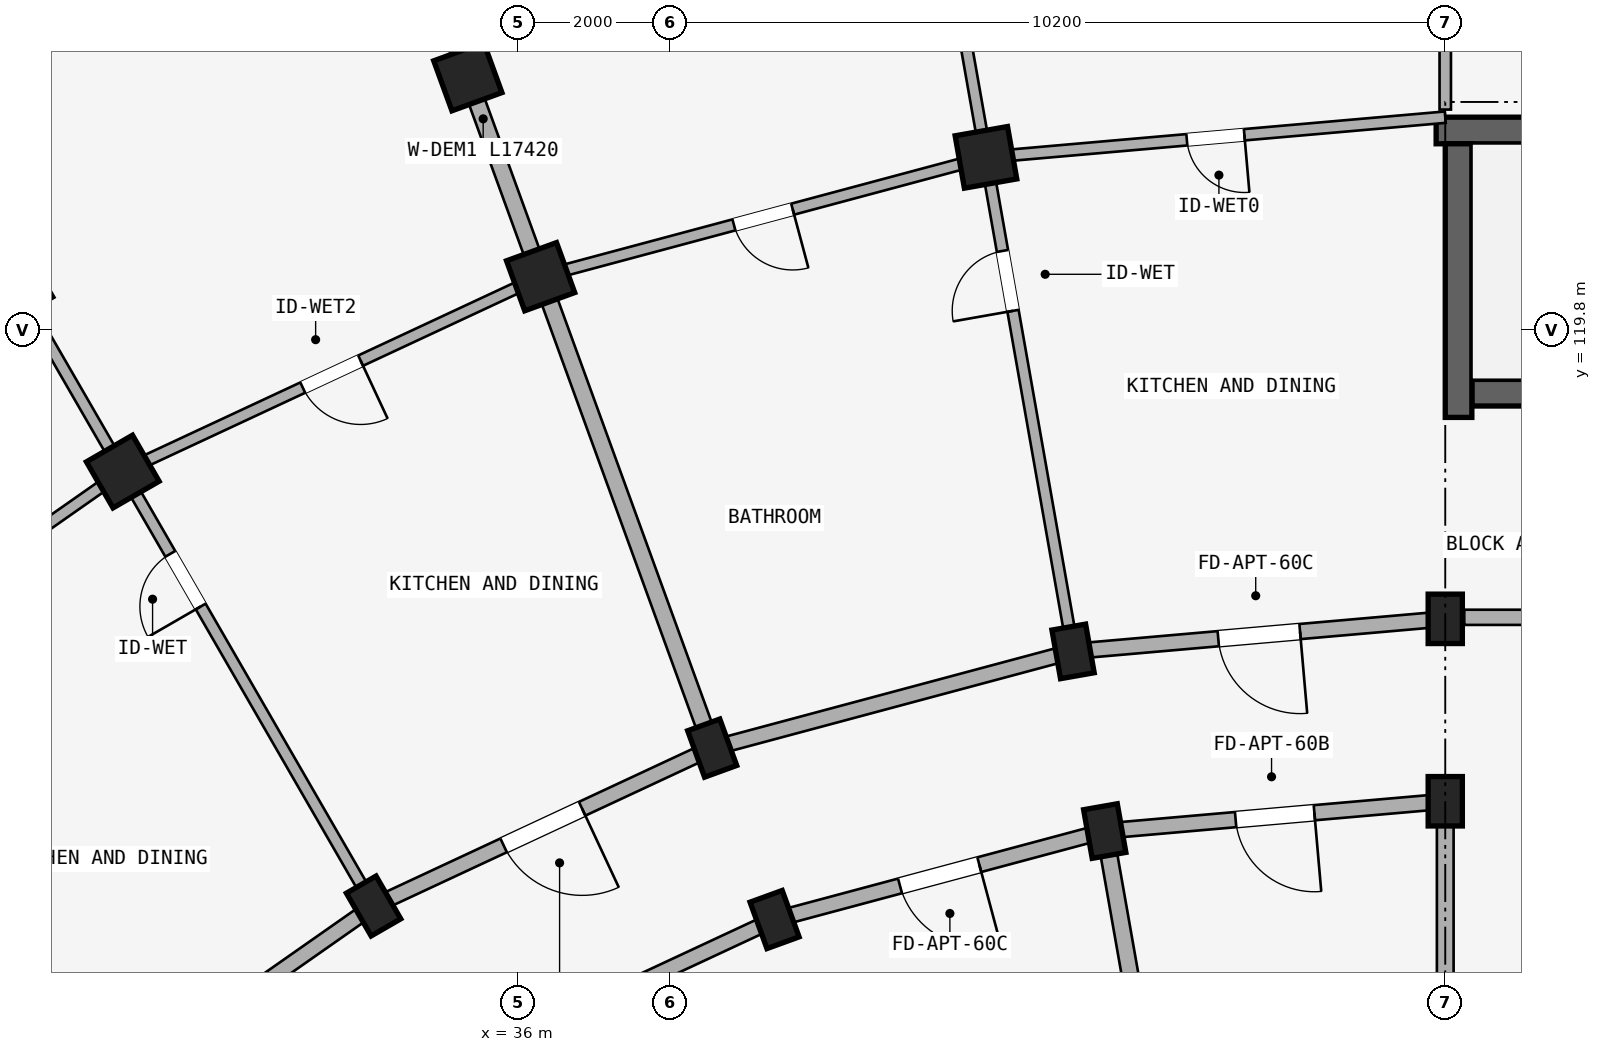
"""IFC4 building model, lengths in metres.
Left out: names, types, materials, properties, quantities, classifications, styles, units other than length and angle.
Written with IfcOpenShell. Run it as: python <this file> out.ifc"""

import sys

from ifc_helpers import new_model, si_unit, direction, frame, frame_2d, origin, origin_2d, place, context, subcontext, project, spatial, rectangle, extrude, element, fill, save


model = new_model("IFC4")
c1 = context("Model", 3, precision=1e-05, world=origin(), true_north=direction((0.0, 1.0)))
c2 = subcontext(c1, "Body", "Model", "MODEL_VIEW")
j1 = project(units=[si_unit("LENGTHUNIT", "METRE"), si_unit("PLANEANGLEUNIT", "RADIAN")], contexts=[c1])
p1 = place(None, origin())
s1 = spatial("IfcSite", under=j1, at=p1, CompositionType="ELEMENT")
p2 = place(p1, origin())
s2 = spatial("IfcBuilding", under=s1, at=p2, CompositionType="ELEMENT")
p3 = place(p2, frame((0.0, 0.0, 27.6)))
s3 = spatial("IfcBuildingStorey", under=s2, at=p3, CompositionType="ELEMENT", Elevation=27.6)
p4 = place(p3, frame((48.08, 122.425, 0.0), z_axis=(0.0, 0.0, 1.0), x_axis=(1.0, 0.0, 0.0)))
e1 = element("IfcWall", 1, at=p4, inside=s3, PredefinedType="SHEAR", context=c2, shape_type="SweptSolid", body=[
    extrude(rectangle(XDim=8.545, YDim=0.35, at=frame_2d((4.272, 0.0))), origin(), (0.0, 0.0, 1.0), 2.93),
])
p5 = place(p3, frame((48.55, 118.975, 0.0), z_axis=(0.0, 0.0, 1.0), x_axis=(1.0, 0.0, 0.0)))
e2 = element("IfcWall", 2, at=p5, inside=s3, PredefinedType="SHEAR", context=c2, shape_type="SweptSolid", body=[
    extrude(rectangle(XDim=8.075, YDim=0.35, at=frame_2d((4.038, 0.0))), origin(), (0.0, 0.0, 1.0), 2.93),
])
p6 = place(p5, frame((6.38, 0.0, 0.0)))
e3 = element("IfcOpeningElement", 3, at=p6, cuts=e2, PredefinedType="OPENING", context=c2, shape_type="SweptSolid", body=[
    extrude(rectangle(XDim=1.24, YDim=2.15, at=frame_2d((0.62, 1.075))), frame((0.0, 0.185, 0.0), z_axis=(0.0, -1.0, 0.0), x_axis=(1.0, 0.0, 0.0)), (0.0, 0.0, 1.0), 0.37),
])
p7 = place(p3, frame((48.375, 118.65, 0.0), z_axis=(0.0, 0.0, 1.0), x_axis=(0.0, 1.0, 0.0)))
e4 = element("IfcWall", 4, at=p7, inside=s3, PredefinedType="SHEAR", context=c2, shape_type="SweptSolid", body=[
    extrude(rectangle(XDim=3.6, YDim=0.35, at=frame_2d((1.8, 0.0))), origin(), (0.0, 0.0, 1.0), 2.93),
])
for number, where, z_axis, x_axis in (
    (5, (48.2, 113.6, 0.0), (0.0, 0.0, 1.0), (1.0, 0.0, 0.0)),
    (6, (48.2, 116.0, 0.0), (0.0, 0.0, 1.0), (1.0, 0.0, 0.0)),
    (7, (43.72, 113.208, 0.0), (0.0, 0.0, 1.0), (0.985, 0.174, 0.0)),
    (8, (43.303, 115.572, 0.0), (0.0, 0.0, 1.0), (0.985, 0.174, 0.0)),
):
    element("IfcColumn", number, at=place(p3, frame(where, z_axis=z_axis, x_axis=x_axis)), inside=s3, PredefinedType="COLUMN", context=c2, shape_type="SweptSolid", body=[
        extrude(rectangle(XDim=0.45, YDim=0.65, at=origin_2d()), origin(), (0.0, 0.0, 1.0), 2.93),
    ])
p8 = place(p3, frame((42.157, 122.071, 0.0), z_axis=(0.0, 0.0, 1.0), x_axis=(0.984807753012, 0.173648177667, 0.0)))
e9 = element("IfcColumn", 9, at=p8, inside=s3, PredefinedType="COLUMN", context=c2, shape_type="SweptSolid", body=[
    extrude(rectangle(XDim=0.7, YDim=0.7, at=origin_2d()), origin(), (0.0, 0.0, 1.0), 2.93),
])
for number, where, z_axis, x_axis in (
    (10, (39.376, 112.044, 0.0), (0.0, 0.0, 1.0), (0.94, 0.342, 0.0)),
    (11, (38.555, 114.299, 0.0), (0.0, 0.0, 1.0), (0.94, 0.342, 0.0)),
):
    element("IfcColumn", number, at=place(p3, frame(where, z_axis=z_axis, x_axis=x_axis)), inside=s3, PredefinedType="COLUMN", context=c2, shape_type="SweptSolid", body=[
        extrude(rectangle(XDim=0.45, YDim=0.65, at=origin_2d()), origin(), (0.0, 0.0, 1.0), 2.93),
    ])
for number, where, z_axis, x_axis in (
    (12, (36.298, 120.501, 0.0), (0.0, 0.0, 1.0), (0.94, 0.342, 0.0)),
    (13, (35.34, 123.132, 0.0), (0.0, 0.0, 1.0), (0.94, 0.342, 0.0)),
):
    element("IfcColumn", number, at=place(p3, frame(where, z_axis=z_axis, x_axis=x_axis)), inside=s3, PredefinedType="COLUMN", context=c2, shape_type="SweptSolid", body=[
        extrude(rectangle(XDim=0.7, YDim=0.7, at=origin_2d()), origin(), (0.0, 0.0, 1.0), 2.93),
    ])
p9 = place(p3, frame((34.1, 112.222, 0.0), z_axis=(0.0, 0.0, 1.0), x_axis=(0.866025403784, 0.5, 0.0)))
e14 = element("IfcColumn", 14, at=p9, inside=s3, PredefinedType="COLUMN", context=c2, shape_type="SweptSolid", body=[
    extrude(rectangle(XDim=0.45, YDim=0.65, at=origin_2d()), origin(), (0.0, 0.0, 1.0), 2.93),
])
for number, where, z_axis, x_axis in (
    (15, (30.8, 117.938, 0.0), (0.0, 0.0, 1.0), (0.866, 0.5, 0.0)),
    (16, (29.4, 120.363, 0.0), (0.0, 0.0, 1.0), (0.866, 0.5, 0.0)),
):
    element("IfcColumn", number, at=place(p3, frame(where, z_axis=z_axis, x_axis=x_axis)), inside=s3, PredefinedType="COLUMN", context=c2, shape_type="SweptSolid", body=[
        extrude(rectangle(XDim=0.7, YDim=0.7, at=origin_2d()), origin(), (0.0, 0.0, 1.0), 2.93),
    ])
p10 = place(p3, frame((48.45, 116.02, 0.0), z_axis=(0.0, 0.0, 1.0), x_axis=(1.0, 0.0, 0.0)))
e17 = element("IfcWall", 17, at=p10, inside=s3, PredefinedType="STANDARD", context=c2, shape_type="SweptSolid", body=[
    extrude(rectangle(XDim=5.25, YDim=0.2, at=frame_2d((2.625, 0.0))), origin(), (0.0, 0.0, 1.0), 2.372),
])
p11 = place(p10, frame((2.165, 0.0, 0.0)))
e18 = element("IfcOpeningElement", 18, at=p11, cuts=e17, PredefinedType="OPENING", context=c2, shape_type="SweptSolid", body=[
    extrude(rectangle(XDim=0.92, YDim=2.1, at=frame_2d((0.46, 1.05))), frame((0.0, 0.11, 0.0), z_axis=(0.0, -1.0, 0.0), x_axis=(1.0, 0.0, 0.0)), (0.0, 0.0, 1.0), 0.22),
])
p12 = place(p3, frame((48.2, 113.6, 0.0), z_axis=(0.0, 0.0, 1.0), x_axis=(-0.996191949488, -0.087187153726, 0.0)))
e19 = element("IfcWall", 19, at=p12, inside=s3, PredefinedType="STANDARD", context=c2, shape_type="SweptSolid", body=[
    extrude(rectangle(XDim=4.497, YDim=0.2, at=frame_2d((2.249, 0.0))), origin(), (0.0, 0.0, 1.0), 2.372),
])
p13 = place(p12, frame((1.729, 0.0, 0.0)))
e20 = element("IfcOpeningElement", 20, at=p13, cuts=e19, PredefinedType="OPENING", context=c2, shape_type="SweptSolid", body=[
    extrude(rectangle(XDim=1.04, YDim=2.15, at=frame_2d((0.52, 1.075))), frame((0.0, 0.11, 0.0), z_axis=(0.0, -1.0, 0.0), x_axis=(1.0, 0.0, 0.0)), (0.0, 0.0, 1.0), 0.22),
])
p14 = place(p3, frame((48.2, 116.0, 0.0), z_axis=(0.0, 0.0, 1.0), x_axis=(-0.996193663584, -0.087167566415, 0.0)))
e21 = element("IfcWall", 21, at=p14, inside=s3, PredefinedType="STANDARD", context=c2, shape_type="SweptSolid", body=[
    extrude(rectangle(XDim=4.916, YDim=0.2, at=frame_2d((2.458, 0.0))), origin(), (0.0, 0.0, 1.0), 2.372),
])
p15 = place(p14, frame((1.918, 0.0, 0.0)))
e22 = element("IfcOpeningElement", 22, at=p15, cuts=e21, PredefinedType="OPENING", context=c2, shape_type="SweptSolid", body=[
    extrude(rectangle(XDim=1.08, YDim=2.15, at=frame_2d((0.54, 1.075))), frame((0.0, 0.11, 0.0), z_axis=(0.0, -1.0, 0.0), x_axis=(1.0, 0.0, 0.0)), (0.0, 0.0, 1.0), 0.22),
])
p16 = place(p3, frame((43.72, 113.208, 0.0), z_axis=(0.0, 0.0, 1.0), x_axis=(-0.965934240054, -0.258787642463, 0.0)))
e23 = element("IfcWall", 23, at=p16, inside=s3, PredefinedType="STANDARD", context=c2, shape_type="SweptSolid", body=[
    extrude(rectangle(XDim=4.497, YDim=0.2, at=frame_2d((2.249, 0.0))), origin(), (0.0, 0.0, 1.0), 2.372),
])
p17 = place(p16, frame((1.709, 0.0, 0.0)))
e24 = element("IfcOpeningElement", 24, at=p17, cuts=e23, PredefinedType="OPENING", context=c2, shape_type="SweptSolid", body=[
    extrude(rectangle(XDim=1.08, YDim=2.15, at=frame_2d((0.54, 1.075))), frame((0.0, 0.11, 0.0), z_axis=(0.0, -1.0, 0.0), x_axis=(1.0, 0.0, 0.0)), (0.0, 0.0, 1.0), 0.22),
])
p18 = place(p3, frame((43.303, 115.572, 0.0), z_axis=(0.0, 0.0, 1.0), x_axis=(-0.965930095386, -0.258803112091, 0.0)))
e25 = element("IfcWall", 25, at=p18, inside=s3, PredefinedType="STANDARD", context=c2, shape_type="SweptSolid", body=[
    extrude(rectangle(XDim=4.916, YDim=0.2, at=frame_2d((2.458, 0.0))), origin(), (0.0, 0.0, 1.0), 2.372),
])
p19 = place(p3, frame((39.376, 112.044, 0.0), z_axis=(0.0, 0.0, 1.0), x_axis=(-0.906307919131, -0.422617978463, 0.0)))
e26 = element("IfcWall", 26, at=p19, inside=s3, PredefinedType="STANDARD", context=c2, shape_type="SweptSolid", body=[
    extrude(rectangle(XDim=4.497, YDim=0.2, at=frame_2d((2.249, 0.0))), origin(), (0.0, 0.0, 1.0), 2.372),
])
p20 = place(p3, frame((38.555, 114.299, 0.0), z_axis=(0.0, 0.0, 1.0), x_axis=(-0.906302381024, -0.422629854778, 0.0)))
e27 = element("IfcWall", 27, at=p20, inside=s3, PredefinedType="STANDARD", context=c2, shape_type="SweptSolid", body=[
    extrude(rectangle(XDim=4.915, YDim=0.2, at=frame_2d((2.458, 0.0))), origin(), (0.0, 0.0, 1.0), 2.372),
])
p21 = place(p20, frame((1.888, 0.0, 0.0)))
e28 = element("IfcOpeningElement", 28, at=p21, cuts=e27, PredefinedType="OPENING", context=c2, shape_type="SweptSolid", body=[
    extrude(rectangle(XDim=1.14, YDim=2.15, at=frame_2d((0.57, 1.075))), frame((0.0, 0.11, 0.0), z_axis=(0.0, -1.0, 0.0), x_axis=(1.0, 0.0, 0.0)), (0.0, 0.0, 1.0), 0.22),
])
p22 = place(p3, frame((34.1, 112.222, 0.0), z_axis=(0.0, 0.0, 1.0), x_axis=(-0.819140911474, -0.573592335331, 0.0)))
e29 = element("IfcWall", 29, at=p22, inside=s3, PredefinedType="STANDARD", context=c2, shape_type="SweptSolid", body=[
    extrude(rectangle(XDim=4.916, YDim=0.2, at=frame_2d((2.458, 0.0))), origin(), (0.0, 0.0, 1.0), 2.372),
])
p23 = place(p3, frame((48.2, 110.35, 0.0), z_axis=(0.0, 0.0, 1.0), x_axis=(0.0, 1.0, 0.0)))
e30 = element("IfcWall", 30, at=p23, inside=s3, PredefinedType="STANDARD", context=c2, shape_type="SweptSolid", body=[
    extrude(rectangle(XDim=3.2, YDim=0.22, at=frame_2d((1.6, 0.0))), origin(), (0.0, 0.0, 1.0), 2.372),
])
p24 = place(p3, frame((48.2, 122.7, 0.0), z_axis=(0.0, 0.0, 1.0), x_axis=(0.0, 1.0, 0.0)))
e31 = element("IfcWall", 31, at=p24, inside=s3, PredefinedType="PARTITIONING", context=c2, shape_type="SweptSolid", body=[
    extrude(rectangle(XDim=10.82, YDim=0.15, at=frame_2d((5.41, 0.0))), origin(), (0.0, 0.0, 1.0), 2.372),
])
p25 = place(p24, frame((0.899, 0.0, 0.0)))
e32 = element("IfcOpeningElement", 32, at=p25, cuts=e31, PredefinedType="OPENING", context=c2, shape_type="SweptSolid", body=[
    extrude(rectangle(XDim=0.8, YDim=2.1, at=frame_2d((0.4, 1.05))), frame((0.0, 0.085, 0.0), z_axis=(0.0, -1.0, 0.0), x_axis=(1.0, 0.0, 0.0)), (0.0, 0.0, 1.0), 0.17),
])
p26 = place(p3, frame((44.901, 106.511, 0.0), z_axis=(0.0, 0.0, 1.0), x_axis=(-0.173647089161, 0.984807944945, 0.0)))
e33 = element("IfcWall", 33, at=p26, inside=s3, PredefinedType="STANDARD", context=c2, shape_type="SweptSolid", body=[
    extrude(rectangle(XDim=6.75, YDim=0.22, at=frame_2d((3.375, 0.0))), origin(), (0.0, 0.0, 1.0), 2.372),
])
p27 = place(p3, frame((43.286, 115.67, 0.0), z_axis=(0.0, 0.0, 1.0), x_axis=(-0.173646216546, 0.984808098809, 0.0)))
e34 = element("IfcWall", 34, at=p27, inside=s3, PredefinedType="PARTITIONING", context=c2, shape_type="SweptSolid", body=[
    extrude(rectangle(XDim=17.42, YDim=0.15, at=frame_2d((8.71, 0.0))), origin(), (0.0, 0.0, 1.0), 2.372),
])
p28 = place(p27, frame((4.45, 0.0, 0.0)))
e35 = element("IfcOpeningElement", 35, at=p28, cuts=e34, PredefinedType="OPENING", context=c2, shape_type="SweptSolid", body=[
    extrude(rectangle(XDim=0.8, YDim=2.1, at=frame_2d((0.4, 1.05))), frame((0.0, 0.085, 0.0), z_axis=(0.0, -1.0, 0.0), x_axis=(1.0, 0.0, 0.0)), (0.0, 0.0, 1.0), 0.17),
])
p29 = place(p3, frame((38.521, 114.393, 0.0), z_axis=(0.0, 0.0, 1.0), x_axis=(-0.342022120477, 0.939691901159, 0.0)))
e36 = element("IfcWall", 36, at=p29, inside=s3, PredefinedType="STANDARD", context=c2, shape_type="SweptSolid", body=[
    extrude(rectangle(XDim=17.42, YDim=0.22, at=frame_2d((8.71, 0.0))), origin(), (0.0, 0.0, 1.0), 2.372),
])
p30 = place(p3, frame((34.05, 112.309, 0.0), z_axis=(0.0, 0.0, 1.0), x_axis=(-0.499997843263, 0.866026648973, 0.0)))
e37 = element("IfcWall", 37, at=p30, inside=s3, PredefinedType="PARTITIONING", context=c2, shape_type="SweptSolid", body=[
    extrude(rectangle(XDim=17.42, YDim=0.15, at=frame_2d((8.71, 0.0))), origin(), (0.0, 0.0, 1.0), 2.372),
])
p31 = place(p30, frame((4.45, 0.0, 0.0)))
e38 = element("IfcOpeningElement", 38, at=p31, cuts=e37, PredefinedType="OPENING", context=c2, shape_type="SweptSolid", body=[
    extrude(rectangle(XDim=0.8, YDim=2.1, at=frame_2d((0.4, 1.05))), frame((0.0, 0.085, 0.0), z_axis=(0.0, -1.0, 0.0), x_axis=(1.0, 0.0, 0.0)), (0.0, 0.0, 1.0), 0.17),
])
p32 = place(p3, frame((30.009, 109.479, 0.0), z_axis=(0.0, 0.0, 1.0), x_axis=(-0.642784757967, 0.766046835987, 0.0)))
e39 = element("IfcWall", 39, at=p32, inside=s3, PredefinedType="PARTITIONING", context=c2, shape_type="SweptSolid", body=[
    extrude(rectangle(XDim=17.42, YDim=0.15, at=frame_2d((8.71, 0.0))), origin(), (0.0, 0.0, 1.0), 2.372),
])
p33 = place(p32, frame((4.45, 0.0, 0.0)))
e40 = element("IfcOpeningElement", 40, at=p33, cuts=e39, PredefinedType="OPENING", context=c2, shape_type="SweptSolid", body=[
    extrude(rectangle(XDim=0.8, YDim=2.1, at=frame_2d((0.4, 1.05))), frame((0.0, 0.085, 0.0), z_axis=(0.0, -1.0, 0.0), x_axis=(1.0, 0.0, 0.0)), (0.0, 0.0, 1.0), 0.17),
])
p34 = place(p3, frame((48.2, 122.6, 0.0), z_axis=(0.0, 0.0, 1.0), x_axis=(-0.996193018494, -0.087174938512, 0.0)))
e41 = element("IfcWall", 41, at=p34, inside=s3, PredefinedType="PLUMBINGWALL", context=c2, shape_type="SweptSolid", body=[
    extrude(rectangle(XDim=6.066, YDim=0.15, at=frame_2d((3.033, 0.0))), origin(), (0.0, 0.0, 1.0), 2.372),
])
p35 = place(p34, frame((2.653, 0.0, 0.0)))
e42 = element("IfcOpeningElement", 42, at=p35, cuts=e41, PredefinedType="OPENING", context=c2, shape_type="SweptSolid", body=[
    extrude(rectangle(XDim=0.76, YDim=2.05, at=frame_2d((0.38, 1.025))), frame((0.0, 0.085, 0.0), z_axis=(0.0, -1.0, 0.0), x_axis=(1.0, 0.0, 0.0)), (0.0, 0.0, 1.0), 0.17),
])
p36 = place(p3, frame((42.157, 122.071, 0.0), z_axis=(0.0, 0.0, 1.0), x_axis=(-0.965923618901, -0.258827283048, 0.0)))
e43 = element("IfcWall", 43, at=p36, inside=s3, PredefinedType="PLUMBINGWALL", context=c2, shape_type="SweptSolid", body=[
    extrude(rectangle(XDim=6.066, YDim=0.15, at=frame_2d((3.033, 0.0))), origin(), (0.0, 0.0, 1.0), 2.372),
])
p37 = place(p36, frame((2.633, 0.0, 0.0)))
e44 = element("IfcOpeningElement", 44, at=p37, cuts=e43, PredefinedType="OPENING", context=c2, shape_type="SweptSolid", body=[
    extrude(rectangle(XDim=0.8, YDim=2.1, at=frame_2d((0.4, 1.05))), frame((0.0, 0.085, 0.0), z_axis=(0.0, -1.0, 0.0), x_axis=(1.0, 0.0, 0.0)), (0.0, 0.0, 1.0), 0.17),
])
p38 = place(p3, frame((36.298, 120.501, 0.0), z_axis=(0.0, 0.0, 1.0), x_axis=(-0.906312656069, -0.42260781991, 0.0)))
e45 = element("IfcWall", 45, at=p38, inside=s3, PredefinedType="PLUMBINGWALL", context=c2, shape_type="SweptSolid", body=[
    extrude(rectangle(XDim=6.066, YDim=0.15, at=frame_2d((3.033, 0.0))), origin(), (0.0, 0.0, 1.0), 2.372),
])
p39 = place(p38, frame((2.613, 0.0, 0.0)))
e46 = element("IfcOpeningElement", 46, at=p39, cuts=e45, PredefinedType="OPENING", context=c2, shape_type="SweptSolid", body=[
    extrude(rectangle(XDim=0.84, YDim=2.1, at=frame_2d((0.42, 1.05))), frame((0.0, 0.085, 0.0), z_axis=(0.0, -1.0, 0.0), x_axis=(1.0, 0.0, 0.0)), (0.0, 0.0, 1.0), 0.17),
])
p40 = place(p3, frame((30.8, 117.938, 0.0), z_axis=(0.0, 0.0, 1.0), x_axis=(-0.81913926159, -0.573594691504, 0.0)))
e47 = element("IfcWall", 47, at=p40, inside=s3, PredefinedType="PLUMBINGWALL", context=c2, shape_type="SweptSolid", body=[
    extrude(rectangle(XDim=6.066, YDim=0.15, at=frame_2d((3.033, 0.0))), origin(), (0.0, 0.0, 1.0), 2.372),
])
p41 = place(p40, frame((2.653, 0.0, 0.0)))
e48 = element("IfcOpeningElement", 48, at=p41, cuts=e47, PredefinedType="OPENING", context=c2, shape_type="SweptSolid", body=[
    extrude(rectangle(XDim=0.76, YDim=2.05, at=frame_2d((0.38, 1.025))), frame((0.0, 0.085, 0.0), z_axis=(0.0, -1.0, 0.0), x_axis=(1.0, 0.0, 0.0)), (0.0, 0.0, 1.0), 0.17),
])
p42 = place(p28, origin())
e49 = element("IfcDoor", 49, at=p42, inside=s3, OperationType="SINGLE_SWING_LEFT", PredefinedType="DOOR", context=c2, shape_type="SweptSolid", body=[
    extrude(rectangle(XDim=0.8, YDim=2.1, at=frame_2d((0.4, 1.05))), frame((0.0, 0.025, 0.0), z_axis=(0.0, -1.0, 0.0), x_axis=(1.0, 0.0, 0.0)), (0.0, 0.0, 1.0), 0.05),
])
fill(e35, e49)
p43 = place(p31, frame((0.8, 0.0, 0.0), z_axis=(0.0, 0.0, 1.0), x_axis=(-1.0, 0.0, 0.0)))
e50 = element("IfcDoor", 50, at=p43, inside=s3, OperationType="SINGLE_SWING_RIGHT", PredefinedType="DOOR", context=c2, shape_type="SweptSolid", body=[
    extrude(rectangle(XDim=0.8, YDim=2.1, at=frame_2d((0.4, 1.05))), frame((0.0, 0.025, 0.0), z_axis=(0.0, -1.0, 0.0), x_axis=(1.0, 0.0, 0.0)), (0.0, 0.0, 1.0), 0.05),
])
fill(e38, e50)
p44 = place(p15, origin())
e51 = element("IfcDoor", 51, at=p44, inside=s3, OperationType="SINGLE_SWING_LEFT", PredefinedType="DOOR", context=c2, shape_type="SweptSolid", body=[
    extrude(rectangle(XDim=1.08, YDim=2.15, at=frame_2d((0.54, 1.075))), frame((0.0, 0.025, 0.0), z_axis=(0.0, -1.0, 0.0), x_axis=(1.0, 0.0, 0.0)), (0.0, 0.0, 1.0), 0.05),
])
fill(e22, e51)
p45 = place(p35, frame((0.76, 0.0, 0.0), z_axis=(0.0, 0.0, 1.0), x_axis=(-1.0, 0.0, 0.0)))
e52 = element("IfcDoor", 52, at=p45, inside=s3, OperationType="SINGLE_SWING_RIGHT", PredefinedType="DOOR", context=c2, shape_type="SweptSolid", body=[
    extrude(rectangle(XDim=0.76, YDim=2.05, at=frame_2d((0.38, 1.025))), frame((0.0, 0.025, 0.0), z_axis=(0.0, -1.0, 0.0), x_axis=(1.0, 0.0, 0.0)), (0.0, 0.0, 1.0), 0.05),
])
fill(e42, e52)
p46 = place(p37, origin())
e53 = element("IfcDoor", 53, at=p46, inside=s3, OperationType="SINGLE_SWING_LEFT", PredefinedType="DOOR", context=c2, shape_type="SweptSolid", body=[
    extrude(rectangle(XDim=0.8, YDim=2.1, at=frame_2d((0.4, 1.05))), frame((0.0, 0.025, 0.0), z_axis=(0.0, -1.0, 0.0), x_axis=(1.0, 0.0, 0.0)), (0.0, 0.0, 1.0), 0.05),
])
fill(e44, e53)
p47 = place(p21, frame((1.14, 0.0, 0.0), z_axis=(0.0, 0.0, 1.0), x_axis=(-1.0, 0.0, 0.0)))
e54 = element("IfcDoor", 54, at=p47, inside=s3, OperationType="SINGLE_SWING_RIGHT", PredefinedType="DOOR", context=c2, shape_type="SweptSolid", body=[
    extrude(rectangle(XDim=1.14, YDim=2.15, at=frame_2d((0.57, 1.075))), frame((0.0, 0.025, 0.0), z_axis=(0.0, -1.0, 0.0), x_axis=(1.0, 0.0, 0.0)), (0.0, 0.0, 1.0), 0.05),
])
fill(e28, e54)
p48 = place(p39, origin())
e55 = element("IfcDoor", 55, at=p48, inside=s3, OperationType="SINGLE_SWING_LEFT", PredefinedType="DOOR", context=c2, shape_type="SweptSolid", body=[
    extrude(rectangle(XDim=0.84, YDim=2.1, at=frame_2d((0.42, 1.05))), frame((0.0, 0.025, 0.0), z_axis=(0.0, -1.0, 0.0), x_axis=(1.0, 0.0, 0.0)), (0.0, 0.0, 1.0), 0.05),
])
fill(e46, e55)
p49 = place(p13, origin())
e56 = element("IfcDoor", 56, at=p49, inside=s3, OperationType="SINGLE_SWING_LEFT", PredefinedType="DOOR", context=c2, shape_type="SweptSolid", body=[
    extrude(rectangle(XDim=1.04, YDim=2.15, at=frame_2d((0.52, 1.075))), frame((0.0, 0.025, 0.0), z_axis=(0.0, -1.0, 0.0), x_axis=(1.0, 0.0, 0.0)), (0.0, 0.0, 1.0), 0.05),
])
fill(e20, e56)
p50 = place(p17, frame((1.08, 0.0, 0.0), z_axis=(0.0, 0.0, 1.0), x_axis=(-1.0, 0.0, 0.0)))
e57 = element("IfcDoor", 57, at=p50, inside=s3, OperationType="SINGLE_SWING_RIGHT", PredefinedType="DOOR", context=c2, shape_type="SweptSolid", body=[
    extrude(rectangle(XDim=1.08, YDim=2.15, at=frame_2d((0.54, 1.075))), frame((0.0, 0.025, 0.0), z_axis=(0.0, -1.0, 0.0), x_axis=(1.0, 0.0, 0.0)), (0.0, 0.0, 1.0), 0.05),
])
fill(e24, e57)
save(model, sys.argv[1])
